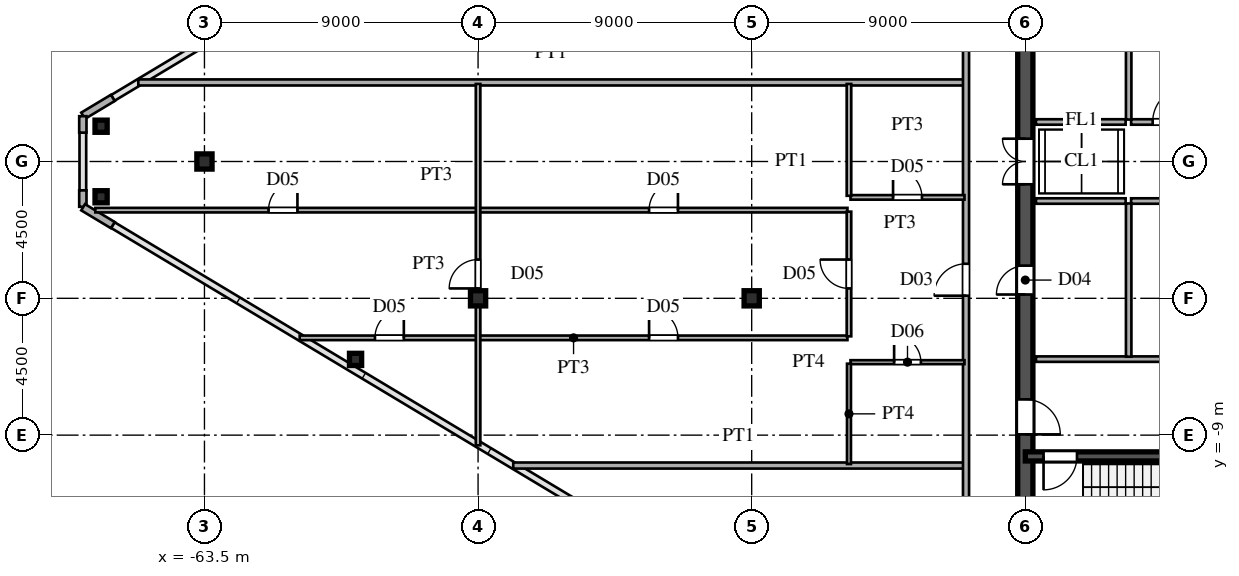
"""IFC4 building model, lengths in metres.
Left out: names, types, materials, properties, quantities, classifications, styles, units other than length and angle.
Written with IfcOpenShell. Run it as: python <this file> out.ifc"""

import sys

from ifc_helpers import new_model, si_unit, direction, frame, frame_2d, origin, origin_2d, place, context, subcontext, project, spatial, rectangle, hollow_rectangle, i_section, extrude, source, transform, mapped, element, fill, save


model = new_model("IFC4")
c1 = context("Model", 3, precision=1e-05, world=origin(), true_north=direction((0.0, 1.0)))
c2 = subcontext(c1, "Body", "Model", "MODEL_VIEW")
j1 = project(units=[si_unit("LENGTHUNIT", "METRE"), si_unit("PLANEANGLEUNIT", "RADIAN")], contexts=[c1])
p1 = place(None, origin())
s1 = spatial("IfcSite", under=j1, at=p1, CompositionType="ELEMENT")
p2 = place(p1, origin())
s2 = spatial("IfcBuilding", under=s1, at=p2, CompositionType="ELEMENT")
p3 = place(p2, frame((0.0, 0.0, 234.6)))
s3 = spatial("IfcBuildingStorey", under=s2, at=p3, CompositionType="ELEMENT", Elevation=234.6)
m1 = source(origin(), c2, "Body", "SweptSolid", [
    extrude(i_section(OverallWidth=0.5, OverallDepth=0.5, WebThickness=0.02, FlangeThickness=0.032, at=origin_2d()), origin(), (0.0, 0.0, 1.0), 4.8),
])
for number, where, z_axis, x_axis in (
    (1, (-45.5, -4.5, 0.0), (0.0, 0.0, 1.0), (1.0, 0.0, 0.0)),
    (2, (-54.5, -4.5, 0.0), (0.0, 0.0, 1.0), (1.0, 0.0, 0.0)),
    (3, (-63.5, 0.0, 0.0), (0.0, 0.0, 1.0), (1.0, 0.0, 0.0)),
):
    element("IfcColumn", number, at=place(p3, frame(where, z_axis=z_axis, x_axis=x_axis)), inside=s3, PredefinedType="COLUMN", context=c2, shape_type="MappedRepresentation", body=[
        mapped(m1, transform((0.0, 0.0, 0.0), scale=1.0)),
    ])
m2 = source(origin(), c2, "Body", "SweptSolid", [
    extrude(hollow_rectangle(XDim=0.4, YDim=0.4, WallThickness=0.016, at=origin_2d()), origin(), (0.0, 0.0, 1.0), 4.8),
])
for number, where, z_axis, x_axis in (
    (4, (-66.9, 1.16, 0.0), (0.0, 0.0, 1.0), (1.0, 0.0, 0.0)),
    (5, (-66.9, -1.16, 0.0), (0.0, 0.0, 1.0), (1.0, 0.0, 0.0)),
    (6, (-58.53, -6.509, 0.0), (0.0, 0.0, 1.0), (1.0, 0.0, 0.0)),
):
    element("IfcColumn", number, at=place(p3, frame(where, z_axis=z_axis, x_axis=x_axis)), inside=s3, PredefinedType="COLUMN", context=c2, shape_type="MappedRepresentation", body=[
        mapped(m2, transform((0.0, 0.0, 0.0), scale=1.0)),
    ])
p4 = place(p3, frame((-66.514, 2.092, 0.0), z_axis=(0.0, 0.0, 1.0), x_axis=(-0.85743623509, -0.514590228002, 0.0)))
e7 = element("IfcWall", 7, at=p4, inside=s3, PredefinedType="SOLIDWALL", context=c2, shape_type="SweptSolid", body=[
    extrude(rectangle(XDim=1.14, YDim=0.24, at=frame_2d((0.57, 0.0))), origin(), (0.0, 0.0, 1.0), 4.58),
])
for number, where, z_axis, x_axis in (
    (8, (-67.5, 1.49, 0.0), (0.0, 0.0, 1.0), (0.0, -1.0, 0.0)),
    (9, (-67.5, -0.95, 0.0), (0.0, 0.0, 1.0), (0.0, -1.0, 0.0)),
):
    element("IfcWall", number, at=place(p3, frame(where, z_axis=z_axis, x_axis=x_axis)), inside=s3, PredefinedType="SOLIDWALL", context=c2, shape_type="SweptSolid", body=[
        extrude(rectangle(XDim=0.54, YDim=0.24, at=frame_2d((0.27, 0.0))), origin(), (0.0, 0.0, 1.0), 4.58),
    ])
p5 = place(p3, frame((-67.491, -1.505, 0.0), z_axis=(0.0, 0.0, 1.0), x_axis=(0.85743623509, -0.514590228002, 0.0)))
e10 = element("IfcWall", 10, at=p5, inside=s3, PredefinedType="SOLIDWALL", context=c2, shape_type="SweptSolid", body=[
    extrude(rectangle(XDim=1.14, YDim=0.24, at=frame_2d((0.57, 0.0))), origin(), (0.0, 0.0, 1.0), 4.58),
])
p6 = place(p3, frame((-36.5, -13.65, 0.0), z_axis=(0.0, 0.0, 1.0), x_axis=(0.0, 1.0, 0.0)))
e11 = element("IfcWall", 11, at=p6, inside=s3, PredefinedType="SHEAR", context=c2, shape_type="SweptSolid", body=[
    extrude(rectangle(XDim=7.15, YDim=0.5, at=frame_2d((3.575, 0.0))), origin(), (0.0, 0.0, 1.0), 4.58),
])
p7 = place(p6, frame((4.675, 0.0, 0.0)))
e12 = element("IfcOpeningElement", 12, at=p7, cuts=e11, PredefinedType="OPENING", context=c2, shape_type="SweptSolid", body=[
    extrude(rectangle(XDim=1.15, YDim=2.2, at=frame_2d((0.575, 1.1))), frame((0.0, 0.26, 0.0), z_axis=(0.0, -1.0, 0.0), x_axis=(1.0, 0.0, 0.0)), (0.0, 0.0, 1.0), 0.52),
])
p8 = place(p3, frame((-36.5, -1.3, 0.0), z_axis=(0.0, 0.0, 1.0), x_axis=(0.0, 1.0, 0.0)))
e13 = element("IfcWall", 13, at=p8, inside=s3, PredefinedType="SHEAR", context=c2, shape_type="SweptSolid", body=[
    extrude(rectangle(XDim=2.6, YDim=0.5, at=frame_2d((1.3, 0.0))), origin(), (0.0, 0.0, 1.0), 4.58),
])
p9 = place(p8, frame((0.55, 0.0, 0.0)))
e14 = element("IfcOpeningElement", 14, at=p9, cuts=e13, PredefinedType="OPENING", context=c2, shape_type="SweptSolid", body=[
    extrude(rectangle(XDim=1.5, YDim=2.3, at=frame_2d((0.75, 1.15))), frame((0.0, 0.26, 0.0), z_axis=(0.0, -1.0, 0.0), x_axis=(1.0, 0.0, 0.0)), (0.0, 0.0, 1.0), 0.52),
])
p10 = place(p3, frame((-36.5, -6.5, 0.0), z_axis=(0.0, 0.0, 1.0), x_axis=(0.0, 1.0, 0.0)))
e15 = element("IfcWall", 15, at=p10, inside=s3, PredefinedType="SHEAR", context=c2, shape_type="SweptSolid", body=[
    extrude(rectangle(XDim=5.2, YDim=0.5, at=frame_2d((2.6, 0.0))), origin(), (0.0, 0.0, 1.0), 4.58),
])
p11 = place(p10, frame((2.125, 0.0, 0.0)))
e16 = element("IfcOpeningElement", 16, at=p11, cuts=e15, PredefinedType="OPENING", context=c2, shape_type="SweptSolid", body=[
    extrude(rectangle(XDim=0.95, YDim=2.15, at=frame_2d((0.475, 1.075))), frame((0.0, 0.26, 0.0), z_axis=(0.0, -1.0, 0.0), x_axis=(1.0, 0.0, 0.0)), (0.0, 0.0, 1.0), 0.52),
])
p12 = place(p3, frame((-36.5, 1.3, 0.0), z_axis=(0.0, 0.0, 1.0), x_axis=(0.0, 1.0, 0.0)))
e17 = element("IfcWall", 17, at=p12, inside=s3, PredefinedType="SHEAR", context=c2, shape_type="SweptSolid", body=[
    extrude(rectangle(XDim=6.9, YDim=0.5, at=frame_2d((3.45, 0.0))), origin(), (0.0, 0.0, 1.0), 4.58),
])
p13 = place(p12, frame((2.975, 0.0, 0.0)))
e18 = element("IfcOpeningElement", 18, at=p13, cuts=e17, PredefinedType="OPENING", context=c2, shape_type="SweptSolid", body=[
    extrude(rectangle(XDim=0.95, YDim=2.15, at=frame_2d((0.475, 1.075))), frame((0.0, 0.26, 0.0), z_axis=(0.0, -1.0, 0.0), x_axis=(1.0, 0.0, 0.0)), (0.0, 0.0, 1.0), 0.52),
])
p14 = place(p3, frame((-36.5, -9.7, 0.0), z_axis=(0.0, 0.0, 1.0), x_axis=(1.0, 0.0, 0.0)))
e19 = element("IfcWall", 19, at=p14, inside=s3, PredefinedType="SHEAR", context=c2, shape_type="SweptSolid", body=[
    extrude(rectangle(XDim=9.0, YDim=0.3, at=frame_2d((4.5, 0.0))), origin(), (0.0, 0.0, 1.0), 4.58),
])
p15 = place(p14, frame((0.6, 0.0, 0.0)))
e20 = element("IfcOpeningElement", 20, at=p15, cuts=e19, PredefinedType="OPENING", context=c2, shape_type="SweptSolid", body=[
    extrude(rectangle(XDim=1.1, YDim=2.2, at=frame_2d((0.55, 1.1))), frame((0.0, 0.16, 0.0), z_axis=(0.0, -1.0, 0.0), x_axis=(1.0, 0.0, 0.0)), (0.0, 0.0, 1.0), 0.32),
])
p16 = place(p3, frame((-36.15, -6.5, 0.0), z_axis=(0.0, 0.0, 1.0), x_axis=(1.0, 0.0, 0.0)))
e21 = element("IfcWall", 21, at=p16, inside=s3, PredefinedType="PARTITIONING", context=c2, shape_type="SweptSolid", body=[
    extrude(rectangle(XDim=5.7, YDim=0.18, at=frame_2d((2.85, 0.0))), origin(), (0.0, 0.0, 1.0), 4.58),
])
p17 = place(p3, frame((-33.1, -6.42, 0.0), z_axis=(0.0, 0.0, 1.0), x_axis=(0.0, 1.0, 0.0)))
e22 = element("IfcWall", 22, at=p17, inside=s3, PredefinedType="PARTITIONING", context=c2, shape_type="SweptSolid", body=[
    extrude(rectangle(XDim=5.04, YDim=0.18, at=frame_2d((2.52, 0.0))), origin(), (0.0, 0.0, 1.0), 4.58),
])
p18 = place(p3, frame((-33.1, 1.38, 0.0), z_axis=(0.0, 0.0, 1.0), x_axis=(0.0, 1.0, 0.0)))
e23 = element("IfcWall", 23, at=p18, inside=s3, PredefinedType="PARTITIONING", context=c2, shape_type="SweptSolid", body=[
    extrude(rectangle(XDim=6.74, YDim=0.18, at=frame_2d((3.37, 0.0))), origin(), (0.0, 0.0, 1.0), 4.58),
])
p19 = place(p3, frame((-33.02, -1.3, 0.0), z_axis=(0.0, 0.0, 1.0), x_axis=(1.0, 0.0, 0.0)))
e24 = element("IfcWall", 24, at=p19, inside=s3, PredefinedType="PARTITIONING", context=c2, shape_type="SweptSolid", body=[
    extrude(rectangle(XDim=5.17, YDim=0.18, at=frame_2d((2.585, 0.0))), origin(), (0.0, 0.0, 1.0), 4.58),
])
p20 = place(p19, frame((2.01, 0.0, 0.0)))
e25 = element("IfcOpeningElement", 25, at=p20, cuts=e24, PredefinedType="OPENING", context=c2, shape_type="SweptSolid", body=[
    extrude(rectangle(XDim=1.15, YDim=2.2, at=frame_2d((0.575, 1.1))), frame((0.0, 0.1, 0.0), z_axis=(0.0, -1.0, 0.0), x_axis=(1.0, 0.0, 0.0)), (0.0, 0.0, 1.0), 0.2),
])
p21 = place(p3, frame((-33.02, 1.3, 0.0), z_axis=(0.0, 0.0, 1.0), x_axis=(1.0, 0.0, 0.0)))
e26 = element("IfcWall", 26, at=p21, inside=s3, PredefinedType="PARTITIONING", context=c2, shape_type="SweptSolid", body=[
    extrude(rectangle(XDim=2.57, YDim=0.18, at=frame_2d((1.285, 0.0))), origin(), (0.0, 0.0, 1.0), 4.58),
])
p22 = place(p21, frame((0.71, 0.0, 0.0)))
e27 = element("IfcOpeningElement", 27, at=p22, cuts=e26, PredefinedType="OPENING", context=c2, shape_type="SweptSolid", body=[
    extrude(rectangle(XDim=1.15, YDim=2.2, at=frame_2d((0.575, 1.1))), frame((0.0, 0.1, 0.0), z_axis=(0.0, -1.0, 0.0), x_axis=(1.0, 0.0, 0.0)), (0.0, 0.0, 1.0), 0.2),
])
for number, where, z_axis, x_axis in (
    (28, (-36.15, -1.3, 0.0), (0.0, 0.0, 1.0), (1.0, 0.0, 0.0)),
    (29, (-36.15, 1.3, 0.0), (0.0, 0.0, 1.0), (1.0, 0.0, 0.0)),
):
    element("IfcWall", number, at=place(p3, frame(where, z_axis=z_axis, x_axis=x_axis)), inside=s3, PredefinedType="PARTITIONING", context=c2, shape_type="SweptSolid", body=[
        extrude(rectangle(XDim=2.95, YDim=0.18, at=frame_2d((1.475, 0.0))), origin(), (0.0, 0.0, 1.0), 4.58),
    ])
p23 = place(p3, frame((-53.343, -10.0, 0.0), z_axis=(0.0, 0.0, 1.0), x_axis=(1.0, 0.0, 0.0)))
e30 = element("IfcWall", 30, at=p23, inside=s3, PredefinedType="PARTITIONING", context=c2, shape_type="SweptSolid", body=[
    extrude(rectangle(XDim=14.813, YDim=0.2, at=frame_2d((7.406, 0.0))), origin(), (0.0, 0.0, 1.0), 4.58),
])
p24 = place(p3, frame((-42.25, -6.6, 0.0), z_axis=(0.0, 0.0, 1.0), x_axis=(1.0, 0.0, 0.0)))
e31 = element("IfcWall", 31, at=p24, inside=s3, PredefinedType="PARTITIONING", context=c2, shape_type="SweptSolid", body=[
    extrude(rectangle(XDim=3.75, YDim=0.13, at=frame_2d((1.875, 0.0))), origin(), (0.0, 0.0, 1.0), 4.58),
])
p25 = place(p24, frame((1.435, 0.0, 0.0)))
e32 = element("IfcOpeningElement", 32, at=p25, cuts=e31, PredefinedType="OPENING", context=c2, shape_type="SweptSolid", body=[
    extrude(rectangle(XDim=0.88, YDim=2.1, at=frame_2d((0.44, 1.05))), frame((0.0, 0.075, 0.0), z_axis=(0.0, -1.0, 0.0), x_axis=(1.0, 0.0, 0.0)), (0.0, 0.0, 1.0), 0.15),
])
p26 = place(p3, frame((-60.368, -5.8, 0.0), z_axis=(0.0, 0.0, 1.0), x_axis=(1.0, 0.0, 0.0)))
e33 = element("IfcWall", 33, at=p26, inside=s3, PredefinedType="PARTITIONING", context=c2, shape_type="SweptSolid", body=[
    extrude(rectangle(XDim=18.018, YDim=0.15, at=frame_2d((9.009, 0.0))), origin(), (0.0, 0.0, 1.0), 4.58),
])
p27 = place(p26, frame((11.493, 0.0, 0.0)))
e34 = element("IfcOpeningElement", 34, at=p27, cuts=e33, PredefinedType="OPENING", context=c2, shape_type="SweptSolid", body=[
    extrude(rectangle(XDim=0.95, YDim=2.15, at=frame_2d((0.475, 1.075))), frame((0.0, 0.085, 0.0), z_axis=(0.0, -1.0, 0.0), x_axis=(1.0, 0.0, 0.0)), (0.0, 0.0, 1.0), 0.17),
])
p28 = place(p26, frame((2.476, 0.0, 0.0)))
e35 = element("IfcOpeningElement", 35, at=p28, cuts=e33, PredefinedType="OPENING", context=c2, shape_type="SweptSolid", body=[
    extrude(rectangle(XDim=0.95, YDim=2.15, at=frame_2d((0.475, 1.075))), frame((0.0, 0.085, 0.0), z_axis=(0.0, -1.0, 0.0), x_axis=(1.0, 0.0, 0.0)), (0.0, 0.0, 1.0), 0.17),
])
p29 = place(p3, frame((-67.09, -1.6, 0.0), z_axis=(0.0, 0.0, 1.0), x_axis=(1.0, 0.0, 0.0)))
e36 = element("IfcWall", 36, at=p29, inside=s3, PredefinedType="PARTITIONING", context=c2, shape_type="SweptSolid", body=[
    extrude(rectangle(XDim=24.74, YDim=0.15, at=frame_2d((12.37, 0.0))), origin(), (0.0, 0.0, 1.0), 4.58),
])
p30 = place(p29, frame((18.215, 0.0, 0.0)))
e37 = element("IfcOpeningElement", 37, at=p30, cuts=e36, PredefinedType="OPENING", context=c2, shape_type="SweptSolid", body=[
    extrude(rectangle(XDim=0.95, YDim=2.15, at=frame_2d((0.475, 1.075))), frame((0.0, 0.085, 0.0), z_axis=(0.0, -1.0, 0.0), x_axis=(1.0, 0.0, 0.0)), (0.0, 0.0, 1.0), 0.17),
])
p31 = place(p29, frame((5.698, 0.0, 0.0)))
e38 = element("IfcOpeningElement", 38, at=p31, cuts=e36, PredefinedType="OPENING", context=c2, shape_type="SweptSolid", body=[
    extrude(rectangle(XDim=0.95, YDim=2.15, at=frame_2d((0.475, 1.075))), frame((0.0, 0.085, 0.0), z_axis=(0.0, -1.0, 0.0), x_axis=(1.0, 0.0, 0.0)), (0.0, 0.0, 1.0), 0.17),
])
p32 = place(p3, frame((-42.25, -1.18, 0.0), z_axis=(0.0, 0.0, 1.0), x_axis=(1.0, 0.0, 0.0)))
e39 = element("IfcWall", 39, at=p32, inside=s3, PredefinedType="PARTITIONING", context=c2, shape_type="SweptSolid", body=[
    extrude(rectangle(XDim=3.75, YDim=0.15, at=frame_2d((1.875, 0.0))), origin(), (0.0, 0.0, 1.0), 4.58),
])
p33 = place(p32, frame((1.4, 0.0, 0.0)))
e40 = element("IfcOpeningElement", 40, at=p33, cuts=e39, PredefinedType="OPENING", context=c2, shape_type="SweptSolid", body=[
    extrude(rectangle(XDim=0.95, YDim=2.15, at=frame_2d((0.475, 1.075))), frame((0.0, 0.085, 0.0), z_axis=(0.0, -1.0, 0.0), x_axis=(1.0, 0.0, 0.0)), (0.0, 0.0, 1.0), 0.17),
])
p34 = place(p3, frame((-65.676, 2.6, 0.0), z_axis=(0.0, 0.0, 1.0), x_axis=(1.0, 0.0, 0.0)))
e41 = element("IfcWall", 41, at=p34, inside=s3, PredefinedType="PARTITIONING", context=c2, shape_type="SweptSolid", body=[
    extrude(rectangle(XDim=27.146, YDim=0.2, at=frame_2d((13.573, 0.0))), origin(), (0.0, 0.0, 1.0), 4.58),
])
p35 = place(p3, frame((-54.5, -9.335, 0.0), z_axis=(0.0, 0.0, 1.0), x_axis=(0.0, 1.0, 0.0)))
e42 = element("IfcWall", 42, at=p35, inside=s3, PredefinedType="PARTITIONING", context=c2, shape_type="SweptSolid", body=[
    extrude(rectangle(XDim=11.885, YDim=0.15, at=frame_2d((5.942, 0.0))), origin(), (0.0, 0.0, 1.0), 3.98),
])
p36 = place(p35, frame((5.16, 0.0, 0.0)))
e43 = element("IfcOpeningElement", 43, at=p36, cuts=e42, PredefinedType="OPENING", context=c2, shape_type="SweptSolid", body=[
    extrude(rectangle(XDim=0.95, YDim=2.15, at=frame_2d((0.475, 1.075))), frame((0.0, 0.085, 0.0), z_axis=(0.0, -1.0, 0.0), x_axis=(1.0, 0.0, 0.0)), (0.0, 0.0, 1.0), 0.17),
])
p37 = place(p3, frame((-42.3, -9.95, 0.0), z_axis=(0.0, 0.0, 1.0), x_axis=(0.0, 1.0, 0.0)))
e44 = element("IfcWall", 44, at=p37, inside=s3, PredefinedType="PARTITIONING", context=c2, shape_type="SweptSolid", body=[
    extrude(rectangle(XDim=3.3, YDim=0.13, at=frame_2d((1.65, 0.0))), origin(), (0.0, 0.0, 1.0), 4.58),
])
p38 = place(p3, frame((-42.3, -5.75, 0.0), z_axis=(0.0, 0.0, 1.0), x_axis=(0.0, 1.0, 0.0)))
e45 = element("IfcWall", 45, at=p38, inside=s3, PredefinedType="PARTITIONING", context=c2, shape_type="SweptSolid", body=[
    extrude(rectangle(XDim=4.1, YDim=0.15, at=frame_2d((2.05, 0.0))), origin(), (0.0, 0.0, 1.0), 4.58),
])
p39 = place(p38, frame((1.575, 0.0, 0.0)))
e46 = element("IfcOpeningElement", 46, at=p39, cuts=e45, PredefinedType="OPENING", context=c2, shape_type="SweptSolid", body=[
    extrude(rectangle(XDim=0.95, YDim=2.15, at=frame_2d((0.475, 1.075))), frame((0.0, 0.085, 0.0), z_axis=(0.0, -1.0, 0.0), x_axis=(1.0, 0.0, 0.0)), (0.0, 0.0, 1.0), 0.17),
])
p40 = place(p3, frame((-42.3, -1.128, 0.0), z_axis=(0.0, 0.0, 1.0), x_axis=(0.0, 1.0, 0.0)))
e47 = element("IfcWall", 47, at=p40, inside=s3, PredefinedType="PARTITIONING", context=c2, shape_type="SweptSolid", body=[
    extrude(rectangle(XDim=3.678, YDim=0.15, at=frame_2d((1.839, 0.0))), origin(), (0.0, 0.0, 1.0), 4.58),
])
p41 = place(p3, frame((-38.45, -15.515, 0.0), z_axis=(0.0, 0.0, 1.0), x_axis=(0.0, 1.0, 0.0)))
e48 = element("IfcWall", 48, at=p41, inside=s3, PredefinedType="PARTITIONING", context=c2, shape_type="SweptSolid", body=[
    extrude(rectangle(XDim=31.03, YDim=0.2, at=frame_2d((15.515, 0.0))), origin(), (0.0, 0.0, 1.0), 4.58),
])
p42 = place(p41, frame((2.19, 0.0, 0.0)))
e49 = element("IfcOpeningElement", 49, at=p42, cuts=e48, PredefinedType="OPENING", context=c2, shape_type="SweptSolid", body=[
    extrude(rectangle(XDim=1.05, YDim=2.25, at=frame_2d((0.525, 1.125))), frame((0.0, 0.11, 0.0), z_axis=(0.0, -1.0, 0.0), x_axis=(1.0, 0.0, 0.0)), (0.0, 0.0, 1.0), 0.22),
])
p43 = place(p41, frame((11.101, 0.0, 0.0)))
e50 = element("IfcOpeningElement", 50, at=p43, cuts=e48, PredefinedType="OPENING", context=c2, shape_type="SweptSolid", body=[
    extrude(rectangle(XDim=1.05, YDim=2.25, at=frame_2d((0.525, 1.125))), frame((0.0, 0.11, 0.0), z_axis=(0.0, -1.0, 0.0), x_axis=(1.0, 0.0, 0.0)), (0.0, 0.0, 1.0), 0.22),
])
p44 = place(p41, frame((24.09, 0.0, 0.0)))
e51 = element("IfcOpeningElement", 51, at=p44, cuts=e48, PredefinedType="OPENING", context=c2, shape_type="SweptSolid", body=[
    extrude(rectangle(XDim=1.05, YDim=2.25, at=frame_2d((0.525, 1.125))), frame((0.0, 0.11, 0.0), z_axis=(0.0, -1.0, 0.0), x_axis=(1.0, 0.0, 0.0)), (0.0, 0.0, 1.0), 0.22),
])
m3 = source(origin(), c2, "Body", "SweptSolid", [
    extrude(rectangle(XDim=1.15, YDim=2.2, at=frame_2d((0.575, 1.1))), frame((0.0, 0.025, 0.0), z_axis=(0.0, -1.0, 0.0), x_axis=(1.0, 0.0, 0.0)), (0.0, 0.0, 1.0), 0.05),
])
p45 = place(p7, frame((1.15, 0.0, 0.0), z_axis=(0.0, 0.0, 1.0), x_axis=(-1.0, 0.0, 0.0)))
e52 = element("IfcDoor", 52, at=p45, inside=s3, OperationType="SINGLE_SWING_LEFT", PredefinedType="DOOR", context=c2, shape_type="MappedRepresentation", body=[
    mapped(m3, transform((0.0, 0.0, 0.0), scale=1.0)),
])
fill(e12, e52)
m4 = source(origin(), c2, "Body", "SweptSolid", [
    extrude(rectangle(XDim=1.5, YDim=2.3, at=frame_2d((0.75, 1.15))), frame((0.0, 0.025, 0.0), z_axis=(0.0, -1.0, 0.0), x_axis=(1.0, 0.0, 0.0)), (0.0, 0.0, 1.0), 0.05),
])
p46 = place(p9, origin())
e53 = element("IfcDoor", 53, at=p46, inside=s3, OperationType="DOUBLE_SWING_LEFT", PredefinedType="DOOR", context=c2, shape_type="MappedRepresentation", body=[
    mapped(m4, transform((0.0, 0.0, 0.0), scale=1.0)),
])
fill(e14, e53)
m5 = source(origin(), c2, "Body", "SweptSolid", [
    extrude(rectangle(XDim=0.95, YDim=2.15, at=frame_2d((0.475, 1.075))), frame((0.0, 0.025, 0.0), z_axis=(0.0, -1.0, 0.0), x_axis=(1.0, 0.0, 0.0)), (0.0, 0.0, 1.0), 0.05),
])
p47 = place(p11, origin())
e54 = element("IfcDoor", 54, at=p47, inside=s3, OperationType="SINGLE_SWING_LEFT", PredefinedType="DOOR", context=c2, shape_type="MappedRepresentation", body=[
    mapped(m5, transform((0.0, 0.0, 0.0), scale=1.0)),
])
fill(e16, e54)
m6 = source(origin(), c2, "Body", "SweptSolid", [
    extrude(rectangle(XDim=1.1, YDim=2.2, at=frame_2d((0.55, 1.1))), frame((0.0, 0.025, 0.0), z_axis=(0.0, -1.0, 0.0), x_axis=(1.0, 0.0, 0.0)), (0.0, 0.0, 1.0), 0.05),
])
p48 = place(p15, frame((1.1, 0.0, 0.0), z_axis=(0.0, 0.0, 1.0), x_axis=(-1.0, 0.0, 0.0)))
e55 = element("IfcDoor", 55, at=p48, inside=s3, OperationType="SINGLE_SWING_LEFT", PredefinedType="DOOR", context=c2, shape_type="MappedRepresentation", body=[
    mapped(m6, transform((0.0, 0.0, 0.0), scale=1.0)),
])
fill(e20, e55)
p49 = place(p22, origin())
e56 = element("IfcDoor", 56, at=p49, inside=s3, OperationType="SINGLE_SWING_RIGHT", PredefinedType="DOOR", context=c2, shape_type="MappedRepresentation", body=[
    mapped(m3, transform((0.0, 0.0, 0.0), scale=1.0)),
])
fill(e27, e56)
m7 = source(origin(), c2, "Body", "SweptSolid", [
    extrude(rectangle(XDim=0.88, YDim=2.1, at=frame_2d((0.44, 1.05))), frame((0.0, 0.025, 0.0), z_axis=(0.0, -1.0, 0.0), x_axis=(1.0, 0.0, 0.0)), (0.0, 0.0, 1.0), 0.05),
])
p50 = place(p25, origin())
e57 = element("IfcDoor", 57, at=p50, inside=s3, OperationType="SINGLE_SWING_LEFT", PredefinedType="DOOR", context=c2, shape_type="MappedRepresentation", body=[
    mapped(m7, transform((0.0, 0.0, 0.0), scale=1.0)),
])
fill(e32, e57)
m8 = source(origin(), c2, "Body", "SweptSolid", [
    extrude(rectangle(XDim=0.95, YDim=2.15, at=frame_2d((0.475, 1.075))), frame((0.0, 0.025, 0.0), z_axis=(0.0, -1.0, 0.0), x_axis=(1.0, 0.0, 0.0)), (0.0, 0.0, 1.0), 0.05),
])
p51 = place(p27, origin())
e58 = element("IfcDoor", 58, at=p51, inside=s3, OperationType="SINGLE_SWING_LEFT", PredefinedType="DOOR", context=c2, shape_type="MappedRepresentation", body=[
    mapped(m8, transform((0.0, 0.0, 0.0), scale=1.0)),
])
fill(e34, e58)
p52 = place(p28, origin())
e59 = element("IfcDoor", 59, at=p52, inside=s3, OperationType="SINGLE_SWING_RIGHT", PredefinedType="DOOR", context=c2, shape_type="MappedRepresentation", body=[
    mapped(m8, transform((0.0, 0.0, 0.0), scale=1.0)),
])
fill(e35, e59)
p53 = place(p30, origin())
e60 = element("IfcDoor", 60, at=p53, inside=s3, OperationType="SINGLE_SWING_RIGHT", PredefinedType="DOOR", context=c2, shape_type="MappedRepresentation", body=[
    mapped(m8, transform((0.0, 0.0, 0.0), scale=1.0)),
])
fill(e37, e60)
p54 = place(p31, origin())
e61 = element("IfcDoor", 61, at=p54, inside=s3, OperationType="SINGLE_SWING_RIGHT", PredefinedType="DOOR", context=c2, shape_type="MappedRepresentation", body=[
    mapped(m8, transform((0.0, 0.0, 0.0), scale=1.0)),
])
fill(e38, e61)
p55 = place(p33, origin())
e62 = element("IfcDoor", 62, at=p55, inside=s3, OperationType="SINGLE_SWING_LEFT", PredefinedType="DOOR", context=c2, shape_type="MappedRepresentation", body=[
    mapped(m8, transform((0.0, 0.0, 0.0), scale=1.0)),
])
fill(e40, e62)
p56 = place(p36, origin())
e63 = element("IfcDoor", 63, at=p56, inside=s3, OperationType="SINGLE_SWING_LEFT", PredefinedType="DOOR", context=c2, shape_type="MappedRepresentation", body=[
    mapped(m8, transform((0.0, 0.0, 0.0), scale=1.0)),
])
fill(e43, e63)
p57 = place(p39, origin())
e64 = element("IfcDoor", 64, at=p57, inside=s3, OperationType="SINGLE_SWING_RIGHT", PredefinedType="DOOR", context=c2, shape_type="MappedRepresentation", body=[
    mapped(m8, transform((0.0, 0.0, 0.0), scale=1.0)),
])
fill(e46, e64)
m9 = source(origin(), c2, "Body", "SweptSolid", [
    extrude(rectangle(XDim=1.05, YDim=2.25, at=frame_2d((0.525, 1.125))), frame((0.0, 0.025, 0.0), z_axis=(0.0, -1.0, 0.0), x_axis=(1.0, 0.0, 0.0)), (0.0, 0.0, 1.0), 0.05),
])
p58 = place(p43, origin())
e65 = element("IfcDoor", 65, at=p58, inside=s3, OperationType="SINGLE_SWING_LEFT", PredefinedType="DOOR", context=c2, shape_type="MappedRepresentation", body=[
    mapped(m9, transform((0.0, 0.0, 0.0), scale=1.0)),
])
fill(e50, e65)
save(model, sys.argv[1])
